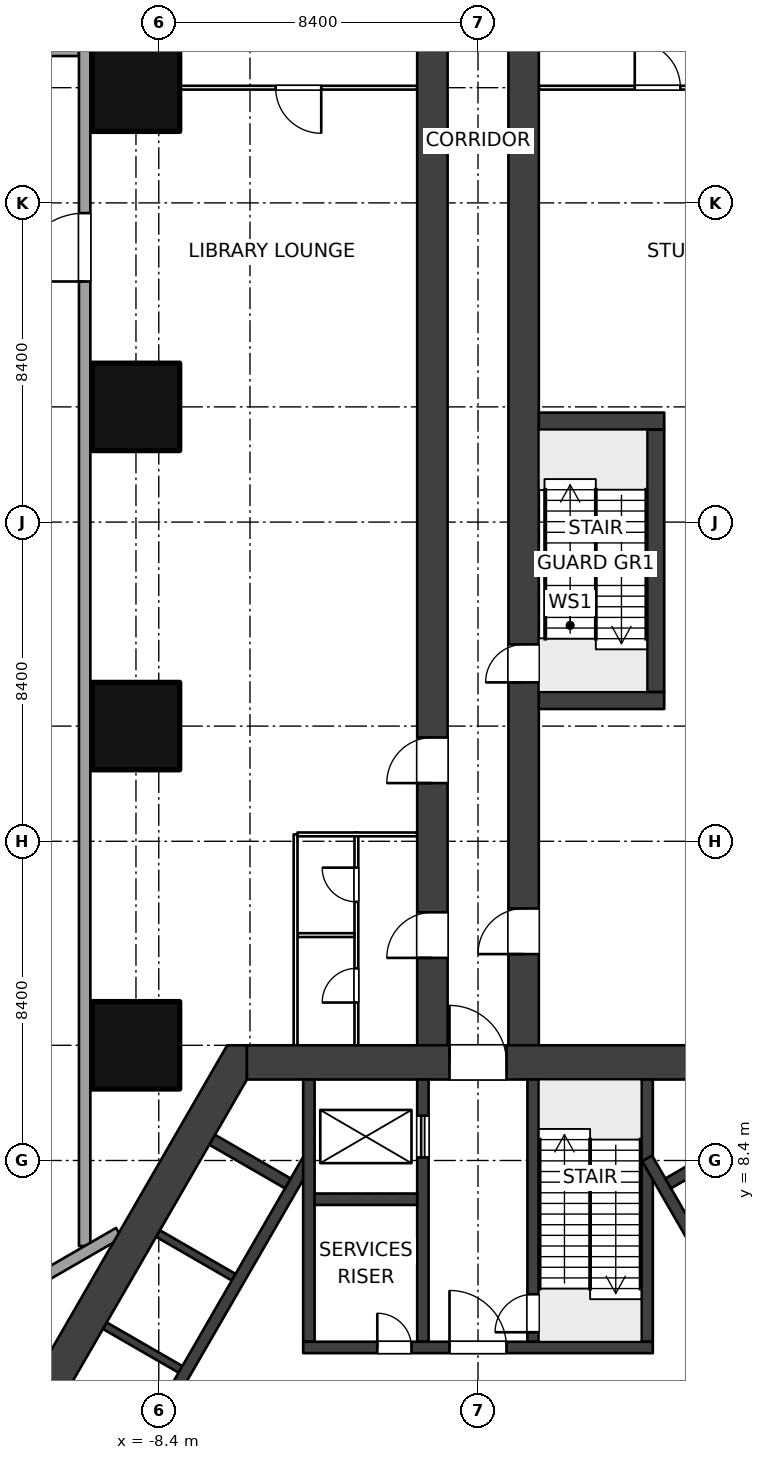
"""IFC4 building model, lengths in metres.
Left out: names, types, materials, properties, quantities, classifications, styles, units other than length and angle.
Written with IfcOpenShell. Run it as: python <this file> out.ifc"""

import sys

from ifc_helpers import new_model, si_unit, direction, frame, frame_2d, origin, origin_2d, place, context, subcontext, project, spatial, polyline, rectangle, outline, extrude, element, fill, save


model = new_model("IFC4")
c1 = context("Model", 3, precision=1e-05, world=origin(), true_north=direction((0.0, 1.0)))
c2 = subcontext(c1, "Body", "Model", "MODEL_VIEW")
j1 = project(units=[si_unit("LENGTHUNIT", "METRE"), si_unit("PLANEANGLEUNIT", "RADIAN")], contexts=[c1])
p1 = place(None, origin())
s1 = spatial("IfcSite", under=j1, at=p1, CompositionType="ELEMENT")
p2 = place(p1, origin())
s2 = spatial("IfcBuilding", under=s1, at=p2, CompositionType="ELEMENT")
p3 = place(p2, frame((0.0, 0.0, 21.0)))
s3 = spatial("IfcBuildingStorey", under=s2, at=p3, CompositionType="ELEMENT", Elevation=21.0)
for number, where, z_axis, x_axis in (
    (1, (-9.0, 11.432, 0.0), (0.0, 0.0, 1.0), (1.0, 0.0, 0.0)),
    (2, (-9.0, 19.832, 0.0), (0.0, 0.0, 1.0), (1.0, 0.0, 0.0)),
    (3, (-9.0, 28.231, 0.0), (0.0, 0.0, 1.0), (1.0, 0.0, 0.0)),
    (4, (-9.0, 36.632, 0.0), (0.0, 0.0, 1.0), (1.0, 0.0, 0.0)),
):
    element("IfcColumn", number, at=place(p3, frame(where, z_axis=z_axis, x_axis=x_axis)), inside=s3, PredefinedType="COLUMN", context=c2, shape_type="SweptSolid", body=[
        extrude(rectangle(XDim=2.3, YDim=2.3, at=origin_2d()), origin(), (0.0, 0.0, 1.0), 5.0),
    ])
p4 = place(p3, frame((-6.08, 10.981, 0.0), z_axis=(0.0, 0.0, 1.0), x_axis=(1.0, 0.0, 0.0)))
e5 = element("IfcWall", 5, at=p4, inside=s3, PredefinedType="SHEAR", context=c2, shape_type="SweptSolid", body=[
    extrude(rectangle(XDim=12.161, YDim=0.9, at=frame_2d((6.08, 0.0))), origin(), (0.0, 0.0, 1.0), 5.0),
])
p5 = place(p4, frame((5.33, 0.0, 0.0)))
e6 = element("IfcOpeningElement", 6, at=p5, cuts=e5, PredefinedType="OPENING", context=c2, shape_type="SweptSolid", body=[
    extrude(rectangle(XDim=1.5, YDim=2.1, at=frame_2d((0.75, 1.05))), frame((0.0, 0.46, 0.0), z_axis=(0.0, -1.0, 0.0), x_axis=(1.0, 0.0, 0.0)), (0.0, 0.0, 1.0), 0.92),
])
p6 = place(p3, origin())
e7 = element("IfcWall", 7, at=p6, inside=s3, PredefinedType="SHEAR", context=c2, shape_type="SweptSolid", body=[
    extrude(outline(polyline([(-6.6, 11.432), (-13.2, 0.0), (-12.94, -0.45), (-12.161, 0.0), (-6.08, 10.531), (-6.08, 11.432), (-6.6, 11.432)])), origin(), (0.0, 0.0, 1.0), 5.0),
])
p7 = place(p3, frame((-4.6, 3.48, 0.0), z_axis=(0.0, 0.0, 1.0), x_axis=(1.0, 0.0, 0.0)))
e8 = element("IfcWall", 8, at=p7, inside=s3, PredefinedType="SHEAR", context=c2, shape_type="SweptSolid", body=[
    extrude(rectangle(XDim=9.2, YDim=0.3, at=frame_2d((4.6, 0.0))), origin(), (0.0, 0.0, 1.0), 5.0),
])
p8 = place(p7, frame((3.85, 0.0, 0.0)))
e9 = element("IfcOpeningElement", 9, at=p8, cuts=e8, PredefinedType="OPENING", context=c2, shape_type="SweptSolid", body=[
    extrude(rectangle(XDim=1.5, YDim=2.1, at=frame_2d((0.75, 1.05))), frame((0.0, 0.16, 0.0), z_axis=(0.0, -1.0, 0.0), x_axis=(1.0, 0.0, 0.0)), (0.0, 0.0, 1.0), 0.32),
])
p9 = place(p7, frame((1.95, 0.0, 0.0)))
e10 = element("IfcOpeningElement", 10, at=p9, cuts=e8, PredefinedType="OPENING", context=c2, shape_type="SweptSolid", body=[
    extrude(rectangle(XDim=0.9, YDim=2.1, at=frame_2d((0.45, 1.05))), frame((0.0, 0.16, 0.0), z_axis=(0.0, -1.0, 0.0), x_axis=(1.0, 0.0, 0.0)), (0.0, 0.0, 1.0), 0.32),
])
p10 = place(p3, frame((1.45, 3.63, 0.0), z_axis=(0.0, 0.0, 1.0), x_axis=(0.0, 1.0, 0.0)))
e11 = element("IfcWall", 11, at=p10, inside=s3, PredefinedType="SHEAR", context=c2, shape_type="SweptSolid", body=[
    extrude(rectangle(XDim=6.902, YDim=0.3, at=frame_2d((3.451, 0.0))), origin(), (0.0, 0.0, 1.0), 5.0),
])
p11 = place(p10, frame((0.25, 0.0, 0.0)))
e12 = element("IfcOpeningElement", 12, at=p11, cuts=e11, PredefinedType="OPENING", context=c2, shape_type="SweptSolid", body=[
    extrude(rectangle(XDim=1.0, YDim=2.1, at=frame_2d((0.5, 1.05))), frame((0.0, 0.16, 0.0), z_axis=(0.0, -1.0, 0.0), x_axis=(1.0, 0.0, 0.0)), (0.0, 0.0, 1.0), 0.32),
])
p12 = place(p3, frame((4.45, 3.63, 0.0), z_axis=(0.0, 0.0, 1.0), x_axis=(0.0, 1.0, 0.0)))
e13 = element("IfcWall", 13, at=p12, inside=s3, PredefinedType="SHEAR", context=c2, shape_type="SweptSolid", body=[
    extrude(rectangle(XDim=6.902, YDim=0.3, at=frame_2d((3.451, 0.0))), origin(), (0.0, 0.0, 1.0), 5.0),
])
p13 = place(p3, frame((-1.45, 3.63, 0.0), z_axis=(0.0, 0.0, 1.0), x_axis=(0.0, 1.0, 0.0)))
e14 = element("IfcWall", 14, at=p13, inside=s3, PredefinedType="SHEAR", context=c2, shape_type="SweptSolid", body=[
    extrude(rectangle(XDim=6.902, YDim=0.3, at=frame_2d((3.451, 0.0))), origin(), (0.0, 0.0, 1.0), 5.0),
])
p14 = place(p13, frame((4.85, 0.0, 0.0)))
e15 = element("IfcOpeningElement", 15, at=p14, cuts=e14, PredefinedType="OPENING", context=c2, shape_type="SweptSolid", body=[
    extrude(rectangle(XDim=1.1, YDim=2.1, at=frame_2d((0.55, 1.05))), frame((0.0, 0.16, 0.0), z_axis=(0.0, -1.0, 0.0), x_axis=(1.0, 0.0, 0.0)), (0.0, 0.0, 1.0), 0.32),
])
p15 = place(p3, frame((-4.45, 3.63, 0.0), z_axis=(0.0, 0.0, 1.0), x_axis=(0.0, 1.0, 0.0)))
e16 = element("IfcWall", 16, at=p15, inside=s3, PredefinedType="SHEAR", context=c2, shape_type="SweptSolid", body=[
    extrude(rectangle(XDim=6.902, YDim=0.3, at=frame_2d((3.451, 0.0))), origin(), (0.0, 0.0, 1.0), 5.0),
])
p16 = place(p3, frame((-4.3, 7.38, 0.0), z_axis=(0.0, 0.0, 1.0), x_axis=(1.0, 0.0, 0.0)))
e17 = element("IfcWall", 17, at=p16, inside=s3, PredefinedType="SHEAR", context=c2, shape_type="SweptSolid", body=[
    extrude(rectangle(XDim=2.7, YDim=0.3, at=frame_2d((1.35, 0.0))), origin(), (0.0, 0.0, 1.0), 5.0),
])
p17 = place(p3, frame((4.45, 8.455, 0.0), z_axis=(0.0, 0.0, 1.0), x_axis=(0.500002290144, -0.866024081565, 0.0)))
e18 = element("IfcWall", 18, at=p17, inside=s3, PredefinedType="SHEAR", context=c2, shape_type="SweptSolid", body=[
    extrude(rectangle(XDim=10.195, YDim=0.3, at=frame_2d((5.098, 0.0))), origin(), (0.0, 0.0, 1.0), 5.0),
])
p18 = place(p3, frame((5.004, 7.796, 0.0), z_axis=(0.0, 0.0, 1.0), x_axis=(0.866053019151, 0.499952165731, 0.0)))
e19 = element("IfcWall", 19, at=p18, inside=s3, PredefinedType="SHEAR", context=c2, shape_type="SweptSolid", body=[
    extrude(rectangle(XDim=2.3, YDim=0.3, at=frame_2d((1.15, 0.0))), origin(), (0.0, 0.0, 1.0), 5.0),
])
p19 = place(p3, frame((-9.548, -0.374, 0.0), z_axis=(0.0, 0.0, 1.0), x_axis=(0.500002290144, 0.866024081565, 0.0)))
e20 = element("IfcWall", 20, at=p19, inside=s3, PredefinedType="SHEAR", context=c2, shape_type="SweptSolid", body=[
    extrude(rectangle(XDim=10.195, YDim=0.3, at=frame_2d((5.098, 0.0))), origin(), (0.0, 0.0, 1.0), 5.0),
])
p20 = place(p3, frame((-5.004, 7.796, 0.0), z_axis=(0.0, 0.0, 1.0), x_axis=(-0.866053019151, 0.499952165731, 0.0)))
e21 = element("IfcWall", 21, at=p20, inside=s3, PredefinedType="SHEAR", context=c2, shape_type="SweptSolid", body=[
    extrude(rectangle(XDim=2.3, YDim=0.3, at=frame_2d((1.15, 0.0))), origin(), (0.0, 0.0, 1.0), 5.0),
])
for number, where, z_axis, x_axis in (
    (22, (-7.829, 2.903, 0.0), (0.0, 0.0, 1.0), (-0.866, 0.5, 0.0)),
    (23, (-6.429, 5.328, 0.0), (0.0, 0.0, 1.0), (-0.866, 0.5, 0.0)),
):
    element("IfcWall", number, at=place(p3, frame(where, z_axis=z_axis, x_axis=x_axis)), inside=s3, PredefinedType="SHEAR", context=c2, shape_type="SweptSolid", body=[
        extrude(rectangle(XDim=2.3, YDim=0.2, at=frame_2d((1.15, 0.0))), origin(), (0.0, 0.0, 1.0), 5.0),
    ])
p21 = place(p3, frame((-1.2, 10.981, 0.0), z_axis=(0.0, 0.0, 1.0), x_axis=(0.0, 1.0, 0.0)))
e24 = element("IfcWall", 24, at=p21, inside=s3, PredefinedType="SHEAR", context=c2, shape_type="SweptSolid", body=[
    extrude(rectangle(XDim=36.75, YDim=0.8, at=frame_2d((18.375, 0.0))), origin(), (0.0, 0.0, 1.0), 5.0),
])
p22 = place(p21, frame((2.75, 0.0, 0.0)))
e25 = element("IfcOpeningElement", 25, at=p22, cuts=e24, PredefinedType="OPENING", context=c2, shape_type="SweptSolid", body=[
    extrude(rectangle(XDim=1.2, YDim=2.1, at=frame_2d((0.6, 1.05))), frame((0.0, 0.41, 0.0), z_axis=(0.0, -1.0, 0.0), x_axis=(1.0, 0.0, 0.0)), (0.0, 0.0, 1.0), 0.82),
])
p23 = place(p21, frame((7.35, 0.0, 0.0)))
e26 = element("IfcOpeningElement", 26, at=p23, cuts=e24, PredefinedType="OPENING", context=c2, shape_type="SweptSolid", body=[
    extrude(rectangle(XDim=1.2, YDim=2.1, at=frame_2d((0.6, 1.05))), frame((0.0, 0.41, 0.0), z_axis=(0.0, -1.0, 0.0), x_axis=(1.0, 0.0, 0.0)), (0.0, 0.0, 1.0), 0.82),
])
p24 = place(p3, frame((1.2, 10.981, 0.0), z_axis=(0.0, 0.0, 1.0), x_axis=(0.0, 1.0, 0.0)))
e27 = element("IfcWall", 27, at=p24, inside=s3, PredefinedType="SHEAR", context=c2, shape_type="SweptSolid", body=[
    extrude(rectangle(XDim=36.75, YDim=0.8, at=frame_2d((18.375, 0.0))), origin(), (0.0, 0.0, 1.0), 5.0),
])
p25 = place(p24, frame((10.0, 0.0, 0.0)))
e28 = element("IfcOpeningElement", 28, at=p25, cuts=e27, PredefinedType="OPENING", context=c2, shape_type="SweptSolid", body=[
    extrude(rectangle(XDim=1.0, YDim=2.1, at=frame_2d((0.5, 1.05))), frame((0.0, 0.41, 0.0), z_axis=(0.0, -1.0, 0.0), x_axis=(1.0, 0.0, 0.0)), (0.0, 0.0, 1.0), 0.82),
])
p26 = place(p24, frame((2.85, 0.0, 0.0)))
e29 = element("IfcOpeningElement", 29, at=p26, cuts=e27, PredefinedType="OPENING", context=c2, shape_type="SweptSolid", body=[
    extrude(rectangle(XDim=1.2, YDim=2.1, at=frame_2d((0.6, 1.05))), frame((0.0, 0.41, 0.0), z_axis=(0.0, -1.0, 0.0), x_axis=(1.0, 0.0, 0.0)), (0.0, 0.0, 1.0), 0.82),
])
p27 = place(p3, frame((-3.2, 11.432, 0.0), z_axis=(0.0, 0.0, 1.0), x_axis=(0.0, 1.0, 0.0)))
e30 = element("IfcWall", 30, at=p27, inside=s3, PredefinedType="PARTITIONING", context=c2, shape_type="SweptSolid", body=[
    extrude(rectangle(XDim=5.6, YDim=0.1, at=frame_2d((2.8, 0.0))), origin(), (0.0, 0.0, 1.0), 4.6),
])
p28 = place(p27, frame((1.125, 0.0, 0.0)))
e31 = element("IfcOpeningElement", 31, at=p28, cuts=e30, PredefinedType="OPENING", context=c2, shape_type="SweptSolid", body=[
    extrude(rectangle(XDim=0.9, YDim=2.1, at=frame_2d((0.45, 1.05))), frame((0.0, 0.06, 0.0), z_axis=(0.0, -1.0, 0.0), x_axis=(1.0, 0.0, 0.0)), (0.0, 0.0, 1.0), 0.12),
])
p29 = place(p27, frame((3.775, 0.0, 0.0)))
e32 = element("IfcOpeningElement", 32, at=p29, cuts=e30, PredefinedType="OPENING", context=c2, shape_type="SweptSolid", body=[
    extrude(rectangle(XDim=0.9, YDim=2.1, at=frame_2d((0.45, 1.05))), frame((0.0, 0.06, 0.0), z_axis=(0.0, -1.0, 0.0), x_axis=(1.0, 0.0, 0.0)), (0.0, 0.0, 1.0), 0.12),
])
p30 = place(p3, frame((-3.25, 14.332, 0.0), z_axis=(0.0, 0.0, 1.0), x_axis=(-1.0, 0.0, 0.0)))
e33 = element("IfcWall", 33, at=p30, inside=s3, PredefinedType="PARTITIONING", context=c2, shape_type="SweptSolid", body=[
    extrude(rectangle(XDim=1.5, YDim=0.1, at=frame_2d((0.75, 0.0))), origin(), (0.0, 0.0, 1.0), 4.6),
])
p31 = place(p3, frame((-4.8, 11.432, 0.0), z_axis=(0.0, 0.0, 1.0), x_axis=(0.0, 1.0, 0.0)))
e34 = element("IfcWall", 34, at=p31, inside=s3, PredefinedType="PARTITIONING", context=c2, shape_type="SweptSolid", body=[
    extrude(rectangle(XDim=5.55, YDim=0.1, at=frame_2d((2.775, 0.0))), origin(), (0.0, 0.0, 1.0), 4.6),
])
p32 = place(p3, frame((-1.6, 16.981, 0.0), z_axis=(0.0, 0.0, 1.0), x_axis=(-1.0, 0.0, 0.0)))
e35 = element("IfcWall", 35, at=p32, inside=s3, PredefinedType="PARTITIONING", context=c2, shape_type="SweptSolid", body=[
    extrude(rectangle(XDim=3.15, YDim=0.1, at=frame_2d((1.575, 0.0))), origin(), (0.0, 0.0, 1.0), 4.6),
])
p33 = place(p3, frame((-1.6, 36.632, 0.0), z_axis=(0.0, 0.0, 1.0), x_axis=(-1.0, 0.0, 0.0)))
e36 = element("IfcWall", 36, at=p33, inside=s3, PredefinedType="PARTITIONING", context=c2, shape_type="SweptSolid", body=[
    extrude(rectangle(XDim=6.25, YDim=0.1, at=frame_2d((3.125, 0.0))), origin(), (0.0, 0.0, 1.0), 2.8),
])
p34 = place(p33, frame((2.525, 0.0, 0.0)))
e37 = element("IfcOpeningElement", 37, at=p34, cuts=e36, PredefinedType="OPENING", context=c2, shape_type="SweptSolid", body=[
    extrude(rectangle(XDim=1.2, YDim=2.1, at=frame_2d((0.6, 1.05))), frame((0.0, 0.06, 0.0), z_axis=(0.0, -1.0, 0.0), x_axis=(1.0, 0.0, 0.0)), (0.0, 0.0, 1.0), 0.12),
])
p35 = place(p3, frame((1.6, 36.632, 0.0), z_axis=(0.0, 0.0, 1.0), x_axis=(1.0, 0.0, 0.0)))
e38 = element("IfcWall", 38, at=p35, inside=s3, PredefinedType="PARTITIONING", context=c2, shape_type="SweptSolid", body=[
    extrude(rectangle(XDim=6.25, YDim=0.1, at=frame_2d((3.125, 0.0))), origin(), (0.0, 0.0, 1.0), 2.8),
])
p36 = place(p35, frame((2.525, 0.0, 0.0)))
e39 = element("IfcOpeningElement", 39, at=p36, cuts=e38, PredefinedType="OPENING", context=c2, shape_type="SweptSolid", body=[
    extrude(rectangle(XDim=1.2, YDim=2.1, at=frame_2d((0.6, 1.05))), frame((0.0, 0.06, 0.0), z_axis=(0.0, -1.0, 0.0), x_axis=(1.0, 0.0, 0.0)), (0.0, 0.0, 1.0), 0.12),
])
p37 = place(p3, frame((-50.237, 37.564, 0.0), z_axis=(0.0, 0.0, 1.0), x_axis=(1.0, 0.0, 0.0)))
e40 = element("IfcWall", 40, at=p37, inside=s3, PredefinedType="SOLIDWALL", context=c2, shape_type="SweptSolid", body=[
    extrude(rectangle(XDim=39.737, YDim=0.2, at=frame_2d((19.869, 0.0))), origin(), (0.0, 0.0, 1.0), 4.6),
])
p38 = place(p37, frame((19.937, 0.0, 0.0)))
e41 = element("IfcOpeningElement", 41, at=p38, cuts=e40, PredefinedType="OPENING", context=c2, shape_type="SweptSolid", body=[
    extrude(rectangle(XDim=1.8, YDim=2.4, at=frame_2d((0.9, 1.2))), frame((0.0, 0.11, 0.0), z_axis=(0.0, -1.0, 0.0), x_axis=(1.0, 0.0, 0.0)), (0.0, 0.0, 1.0), 0.22),
])
p39 = place(p3, frame((-10.35, 6.149, 0.0), z_axis=(0.0, 0.0, 1.0), x_axis=(0.0, 1.0, 0.0)))
e42 = element("IfcWall", 42, at=p39, inside=s3, PredefinedType="SOLIDWALL", context=c2, shape_type="SweptSolid", body=[
    extrude(rectangle(XDim=41.883, YDim=0.3, at=frame_2d((20.941, 0.0))), origin(), (0.0, 0.0, 1.0), 4.6),
])
p40 = place(p39, frame((25.383, 0.0, 0.0)))
e43 = element("IfcOpeningElement", 43, at=p40, cuts=e42, PredefinedType="OPENING", context=c2, shape_type="SweptSolid", body=[
    extrude(rectangle(XDim=1.8, YDim=2.4, at=frame_2d((0.9, 1.2))), frame((0.0, 0.16, 0.0), z_axis=(0.0, -1.0, 0.0), x_axis=(1.0, 0.0, 0.0)), (0.0, 0.0, 1.0), 0.32),
])
p41 = place(p3, frame((-9.45, 6.495, 0.0), z_axis=(0.0, 0.0, 1.0), x_axis=(-0.866027750123, -0.499995936, 0.0)))
e44 = element("IfcWall", 44, at=p41, inside=s3, PredefinedType="SOLIDWALL", context=c2, shape_type="SweptSolid", body=[
    extrude(rectangle(XDim=29.39, YDim=0.3, at=frame_2d((14.695, 0.0))), origin(), (0.0, 0.0, 1.0), 4.6),
])
p42 = place(p41, frame((18.195, 0.0, 0.0)))
e45 = element("IfcOpeningElement", 45, at=p42, cuts=e44, PredefinedType="OPENING", context=c2, shape_type="SweptSolid", body=[
    extrude(rectangle(XDim=1.8, YDim=2.4, at=frame_2d((0.9, 1.2))), frame((0.0, 0.16, 0.0), z_axis=(0.0, -1.0, 0.0), x_axis=(1.0, 0.0, 0.0)), (0.0, 0.0, 1.0), 0.32),
])
for number, where, z_axis, x_axis in (
    (46, (1.6, 20.507, 0.0), (0.0, 0.0, 1.0), (1.0, 0.0, 0.0)),
    (47, (1.6, 27.856, 0.0), (0.0, 0.0, 1.0), (1.0, 0.0, 0.0)),
):
    element("IfcWall", number, at=place(p3, frame(where, z_axis=z_axis, x_axis=x_axis)), inside=s3, PredefinedType="SOLIDWALL", context=c2, shape_type="SweptSolid", body=[
        extrude(rectangle(XDim=3.3, YDim=0.45, at=frame_2d((1.65, 0.0))), origin(), (0.0, 0.0, 1.0), 5.0),
    ])
p43 = place(p3, frame((4.675, 20.731, 0.0), z_axis=(0.0, 0.0, 1.0), x_axis=(0.0, 1.0, 0.0)))
e48 = element("IfcWall", 48, at=p43, inside=s3, PredefinedType="SOLIDWALL", context=c2, shape_type="SweptSolid", body=[
    extrude(rectangle(XDim=6.9, YDim=0.45, at=frame_2d((3.45, 0.0))), origin(), (0.0, 0.0, 1.0), 5.0),
])
p44 = place(p14, origin())
e49 = element("IfcDoor", 49, at=p44, inside=s3, OperationType="DOUBLE_DOOR_SLIDING", PredefinedType="DOOR", context=c2, shape_type="SweptSolid", body=[
    extrude(rectangle(XDim=1.1, YDim=2.1, at=frame_2d((0.55, 1.05))), frame((0.0, 0.025, 0.0), z_axis=(0.0, -1.0, 0.0), x_axis=(1.0, 0.0, 0.0)), (0.0, 0.0, 1.0), 0.05),
])
fill(e15, e49)
p45 = place(p8, origin())
e50 = element("IfcDoor", 50, at=p45, inside=s3, OperationType="DOUBLE_DOOR_DOUBLE_SWING", PredefinedType="DOOR", context=c2, shape_type="SweptSolid", body=[
    extrude(rectangle(XDim=1.5, YDim=2.1, at=frame_2d((0.75, 1.05))), frame((0.0, 0.025, 0.0), z_axis=(0.0, -1.0, 0.0), x_axis=(1.0, 0.0, 0.0)), (0.0, 0.0, 1.0), 0.05),
])
fill(e9, e50)
p46 = place(p9, origin())
e51 = element("IfcDoor", 51, at=p46, inside=s3, OperationType="SINGLE_SWING_LEFT", PredefinedType="DOOR", context=c2, shape_type="SweptSolid", body=[
    extrude(rectangle(XDim=0.9, YDim=2.1, at=frame_2d((0.45, 1.05))), frame((0.0, 0.025, 0.0), z_axis=(0.0, -1.0, 0.0), x_axis=(1.0, 0.0, 0.0)), (0.0, 0.0, 1.0), 0.05),
])
fill(e10, e51)
p47 = place(p11, origin())
e52 = element("IfcDoor", 52, at=p47, inside=s3, OperationType="SINGLE_SWING_LEFT", PredefinedType="DOOR", context=c2, shape_type="SweptSolid", body=[
    extrude(rectangle(XDim=1.0, YDim=2.1, at=frame_2d((0.5, 1.05))), frame((0.0, 0.025, 0.0), z_axis=(0.0, -1.0, 0.0), x_axis=(1.0, 0.0, 0.0)), (0.0, 0.0, 1.0), 0.05),
])
fill(e12, e52)
p48 = place(p5, origin())
e53 = element("IfcDoor", 53, at=p48, inside=s3, OperationType="DOUBLE_DOOR_DOUBLE_SWING", PredefinedType="DOOR", context=c2, shape_type="SweptSolid", body=[
    extrude(rectangle(XDim=1.5, YDim=2.1, at=frame_2d((0.75, 1.05))), frame((0.0, 0.025, 0.0), z_axis=(0.0, -1.0, 0.0), x_axis=(1.0, 0.0, 0.0)), (0.0, 0.0, 1.0), 0.05),
])
fill(e6, e53)
p49 = place(p25, origin())
e54 = element("IfcDoor", 54, at=p49, inside=s3, OperationType="SINGLE_SWING_LEFT", PredefinedType="DOOR", context=c2, shape_type="SweptSolid", body=[
    extrude(rectangle(XDim=1.0, YDim=2.1, at=frame_2d((0.5, 1.05))), frame((0.0, 0.025, 0.0), z_axis=(0.0, -1.0, 0.0), x_axis=(1.0, 0.0, 0.0)), (0.0, 0.0, 1.0), 0.05),
])
fill(e28, e54)
p50 = place(p28, origin())
e55 = element("IfcDoor", 55, at=p50, inside=s3, OperationType="SINGLE_SWING_LEFT", PredefinedType="DOOR", context=c2, shape_type="SweptSolid", body=[
    extrude(rectangle(XDim=0.9, YDim=2.1, at=frame_2d((0.45, 1.05))), frame((0.0, 0.025, 0.0), z_axis=(0.0, -1.0, 0.0), x_axis=(1.0, 0.0, 0.0)), (0.0, 0.0, 1.0), 0.05),
])
fill(e31, e55)
p51 = place(p29, origin())
e56 = element("IfcDoor", 56, at=p51, inside=s3, OperationType="SINGLE_SWING_RIGHT", PredefinedType="DOOR", context=c2, shape_type="SweptSolid", body=[
    extrude(rectangle(XDim=0.9, YDim=2.1, at=frame_2d((0.45, 1.05))), frame((0.0, 0.025, 0.0), z_axis=(0.0, -1.0, 0.0), x_axis=(1.0, 0.0, 0.0)), (0.0, 0.0, 1.0), 0.05),
])
fill(e32, e56)
p52 = place(p22, origin())
e57 = element("IfcDoor", 57, at=p52, inside=s3, OperationType="DOUBLE_SWING_LEFT", PredefinedType="DOOR", context=c2, shape_type="SweptSolid", body=[
    extrude(rectangle(XDim=1.2, YDim=2.1, at=frame_2d((0.6, 1.05))), frame((0.0, 0.025, 0.0), z_axis=(0.0, -1.0, 0.0), x_axis=(1.0, 0.0, 0.0)), (0.0, 0.0, 1.0), 0.05),
])
fill(e25, e57)
p53 = place(p34, origin())
e58 = element("IfcDoor", 58, at=p53, inside=s3, OperationType="DOUBLE_SWING_LEFT", PredefinedType="DOOR", context=c2, shape_type="SweptSolid", body=[
    extrude(rectangle(XDim=1.2, YDim=2.1, at=frame_2d((0.6, 1.05))), frame((0.0, 0.025, 0.0), z_axis=(0.0, -1.0, 0.0), x_axis=(1.0, 0.0, 0.0)), (0.0, 0.0, 1.0), 0.05),
])
fill(e37, e58)
p54 = place(p23, origin())
e59 = element("IfcDoor", 59, at=p54, inside=s3, OperationType="DOUBLE_SWING_LEFT", PredefinedType="DOOR", context=c2, shape_type="SweptSolid", body=[
    extrude(rectangle(XDim=1.2, YDim=2.1, at=frame_2d((0.6, 1.05))), frame((0.0, 0.025, 0.0), z_axis=(0.0, -1.0, 0.0), x_axis=(1.0, 0.0, 0.0)), (0.0, 0.0, 1.0), 0.05),
])
fill(e26, e59)
p55 = place(p36, origin())
e60 = element("IfcDoor", 60, at=p55, inside=s3, OperationType="DOUBLE_SWING_LEFT", PredefinedType="DOOR", context=c2, shape_type="SweptSolid", body=[
    extrude(rectangle(XDim=1.2, YDim=2.1, at=frame_2d((0.6, 1.05))), frame((0.0, 0.025, 0.0), z_axis=(0.0, -1.0, 0.0), x_axis=(1.0, 0.0, 0.0)), (0.0, 0.0, 1.0), 0.05),
])
fill(e39, e60)
p56 = place(p26, origin())
e61 = element("IfcDoor", 61, at=p56, inside=s3, OperationType="DOUBLE_SWING_LEFT", PredefinedType="DOOR", context=c2, shape_type="SweptSolid", body=[
    extrude(rectangle(XDim=1.2, YDim=2.1, at=frame_2d((0.6, 1.05))), frame((0.0, 0.025, 0.0), z_axis=(0.0, -1.0, 0.0), x_axis=(1.0, 0.0, 0.0)), (0.0, 0.0, 1.0), 0.05),
])
fill(e29, e61)
p57 = place(p40, origin())
e62 = element("IfcDoor", 62, at=p57, inside=s3, OperationType="DOUBLE_DOOR_DOUBLE_SWING", PredefinedType="DOOR", context=c2, shape_type="SweptSolid", body=[
    extrude(rectangle(XDim=1.8, YDim=2.4, at=frame_2d((0.9, 1.2))), frame((0.0, 0.025, 0.0), z_axis=(0.0, -1.0, 0.0), x_axis=(1.0, 0.0, 0.0)), (0.0, 0.0, 1.0), 0.05),
])
fill(e43, e62)
save(model, sys.argv[1])
